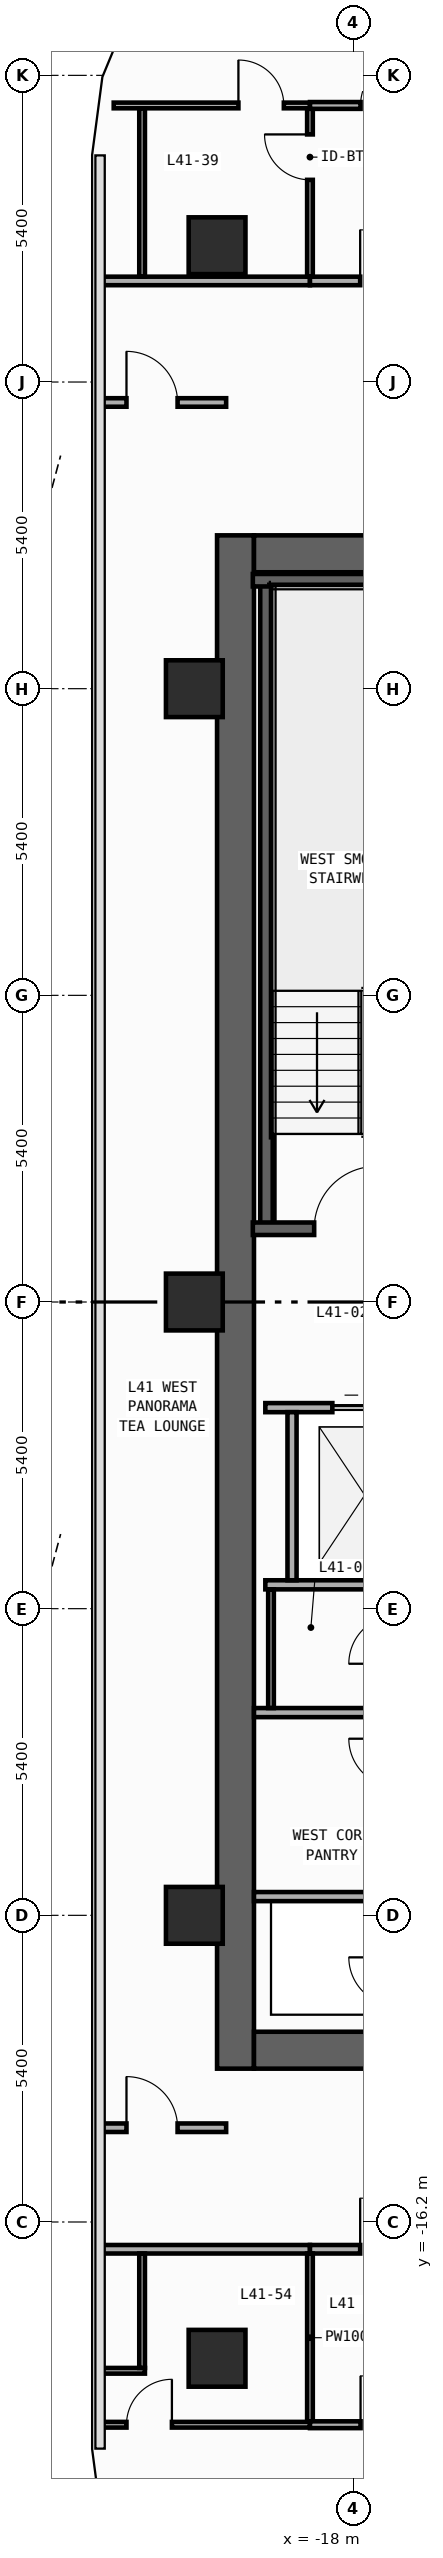
"""IFC4 building model, lengths in metres.
Left out: names, types, materials, properties, quantities, classifications, styles, units other than length and angle.
Written with IfcOpenShell. Run it as: python <this file> out.ifc"""

import sys

from ifc_helpers import new_model, si_unit, direction, frame, frame_2d, origin, origin_2d, place, context, subcontext, project, spatial, rectangle, extrude, element, fill, save


model = new_model("IFC4")
c1 = context("Model", 3, precision=1e-05, world=origin(), true_north=direction((0.0, 1.0)))
c2 = subcontext(c1, "Body", "Model", "MODEL_VIEW")
j1 = project(units=[si_unit("LENGTHUNIT", "METRE"), si_unit("PLANEANGLEUNIT", "RADIAN")], contexts=[c1])
p1 = place(None, origin())
s1 = spatial("IfcSite", under=j1, at=p1, CompositionType="ELEMENT")
p2 = place(p1, origin())
s2 = spatial("IfcBuilding", under=s1, at=p2, CompositionType="ELEMENT")
p3 = place(p2, frame((0.0, 0.0, 180.2)))
s3 = spatial("IfcBuildingStorey", under=s2, at=p3, CompositionType="ELEMENT", Elevation=180.2)
p4 = place(p3, frame((-20.075, -13.5, 0.0), z_axis=(0.0, 0.0, 1.0), x_axis=(0.0, 1.0, 0.0)))
e1 = element("IfcWall", 1, at=p4, inside=s3, PredefinedType="SHEAR", context=c2, shape_type="SweptSolid", body=[
    extrude(rectangle(XDim=27.0, YDim=0.65, at=frame_2d((13.5, 0.0))), origin(), (0.0, 0.0, 1.0), 3.54),
])
for number, where, z_axis, x_axis in (
    (2, (-19.75, -13.175, 0.0), (0.0, 0.0, 1.0), (1.0, 0.0, 0.0)),
    (3, (-19.75, 13.175, 0.0), (0.0, 0.0, 1.0), (1.0, 0.0, 0.0)),
):
    element("IfcWall", number, at=place(p3, frame(where, z_axis=z_axis, x_axis=x_axis)), inside=s3, PredefinedType="SHEAR", context=c2, shape_type="SweptSolid", body=[
        extrude(rectangle(XDim=7.1, YDim=0.65, at=frame_2d((3.55, 0.0))), origin(), (0.0, 0.0, 1.0), 3.54),
    ])
p5 = place(p3, frame((-19.53, 1.29, 0.0), z_axis=(0.0, 0.0, 1.0), x_axis=(0.0, 1.0, 0.0)))
e4 = element("IfcWall", 4, at=p5, inside=s3, PredefinedType="SHEAR", context=c2, shape_type="SweptSolid", body=[
    extrude(rectangle(XDim=11.42, YDim=0.22, at=frame_2d((5.71, 0.0))), origin(), (0.0, 0.0, 1.0), 3.54),
])
p6 = place(p3, frame((-19.77, 12.71, 0.0), z_axis=(0.0, 0.0, 1.0), x_axis=(1.0, 0.0, 0.0)))
e5 = element("IfcWall", 5, at=p6, inside=s3, PredefinedType="SHEAR", context=c2, shape_type="SweptSolid", body=[
    extrude(rectangle(XDim=4.065, YDim=0.22, at=frame_2d((2.032, 0.0))), origin(), (0.0, 0.0, 1.0), 3.54),
])
p7 = place(p3, frame((-19.77, 1.29, 0.0), z_axis=(0.0, 0.0, 1.0), x_axis=(1.0, 0.0, 0.0)))
e6 = element("IfcWall", 6, at=p7, inside=s3, PredefinedType="SHEAR", context=c2, shape_type="SweptSolid", body=[
    extrude(rectangle(XDim=4.065, YDim=0.22, at=frame_2d((2.032, 0.0))), origin(), (0.0, 0.0, 1.0), 3.54),
])
p8 = place(p7, frame((1.08, 0.0, 0.0)))
e7 = element("IfcOpeningElement", 7, at=p8, cuts=e6, PredefinedType="OPENING", context=c2, shape_type="SweptSolid", body=[
    extrude(rectangle(XDim=1.1, YDim=2.2, at=frame_2d((0.55, 1.1))), frame((0.0, 0.12, 0.0), z_axis=(0.0, -1.0, 0.0), x_axis=(1.0, 0.0, 0.0)), (0.0, 0.0, 1.0), 0.24),
])
for number, where, z_axis, x_axis in (
    (8, (-20.4, -18.6, 0.0), (0.0, 0.0, 1.0), (1.0, 0.0, 0.0)),
    (9, (-20.4, 18.6, 0.0), (0.0, 0.0, 1.0), (1.0, 0.0, 0.0)),
    (10, (-20.8, -10.8, 0.0), (0.0, 0.0, 1.0), (1.0, 0.0, 0.0)),
    (11, (-20.8, 0.0, 0.0), (0.0, 0.0, 1.0), (1.0, 0.0, 0.0)),
    (12, (-20.8, 10.8, 0.0), (0.0, 0.0, 1.0), (1.0, 0.0, 0.0)),
):
    element("IfcColumn", number, at=place(p3, frame(where, z_axis=z_axis, x_axis=x_axis)), inside=s3, PredefinedType="COLUMN", context=c2, shape_type="SweptSolid", body=[
        extrude(rectangle(XDim=1.0, YDim=1.0, at=origin_2d()), origin(), (0.0, 0.0, 1.0), 3.8),
    ])
p9 = place(p3, frame((-19.55, -1.86, 0.0), z_axis=(0.0, 0.0, 1.0), x_axis=(1.0, 0.0, 0.0)))
e13 = element("IfcWall", 13, at=p9, inside=s3, PredefinedType="STANDARD", context=c2, shape_type="SweptSolid", body=[
    extrude(rectangle(XDim=3.8, YDim=0.16, at=frame_2d((1.9, 0.0))), origin(), (0.0, 0.0, 1.0), 3.54),
])
p10 = place(p9, frame((1.18, 0.0, 0.0)))
e14 = element("IfcOpeningElement", 14, at=p10, cuts=e13, PredefinedType="OPENING", context=c2, shape_type="SweptSolid", body=[
    extrude(rectangle(XDim=1.15, YDim=2.2, at=frame_2d((0.575, 1.1))), frame((0.0, 0.09, 0.0), z_axis=(0.0, -1.0, 0.0), x_axis=(1.0, 0.0, 0.0)), (0.0, 0.0, 1.0), 0.18),
])
p11 = place(p3, frame((-19.55, -4.98, 0.0), z_axis=(0.0, 0.0, 1.0), x_axis=(1.0, 0.0, 0.0)))
e15 = element("IfcWall", 15, at=p11, inside=s3, PredefinedType="STANDARD", context=c2, shape_type="SweptSolid", body=[
    extrude(rectangle(XDim=3.8, YDim=0.16, at=frame_2d((1.9, 0.0))), origin(), (0.0, 0.0, 1.0), 3.54),
])
p12 = place(p3, frame((-19.08, -4.9, 0.0), z_axis=(0.0, 0.0, 1.0), x_axis=(0.0, 1.0, 0.0)))
e16 = element("IfcWall", 16, at=p12, inside=s3, PredefinedType="STANDARD", context=c2, shape_type="SweptSolid", body=[
    extrude(rectangle(XDim=2.96, YDim=0.16, at=frame_2d((1.48, 0.0))), origin(), (0.0, 0.0, 1.0), 3.54),
])
for number, where, z_axis, x_axis in (
    (17, (-19.75, -10.47, 0.0), (0.0, 0.0, 1.0), (1.0, 0.0, 0.0)),
    (18, (-19.75, -7.23, 0.0), (0.0, 0.0, 1.0), (1.0, 0.0, 0.0)),
):
    element("IfcWall", number, at=place(p3, frame(where, z_axis=z_axis, x_axis=x_axis)), inside=s3, PredefinedType="PARTITIONING", context=c2, shape_type="SweptSolid", body=[
        extrude(rectangle(XDim=2.44, YDim=0.16, at=frame_2d((1.22, 0.0))), origin(), (0.0, 0.0, 1.0), 3.54),
    ])
p13 = place(p3, frame((-22.455, 17.98, 0.0), z_axis=(0.0, 0.0, 1.0), x_axis=(1.0, 0.0, 0.0)))
e19 = element("IfcWall", 19, at=p13, inside=s3, PredefinedType="PARTITIONING", context=c2, shape_type="SweptSolid", body=[
    extrude(rectangle(XDim=3.691, YDim=0.15, at=frame_2d((1.846, 0.0))), origin(), (0.0, 0.0, 1.0), 3.54),
])
p14 = place(p3, frame((-18.764, 17.98, 0.0), z_axis=(0.0, 0.0, 1.0), x_axis=(1.0, 0.0, 0.0)))
e20 = element("IfcWall", 20, at=p14, inside=s3, PredefinedType="PARTITIONING", context=c2, shape_type="SweptSolid", body=[
    extrude(rectangle(XDim=4.364, YDim=0.15, at=frame_2d((2.182, 0.0))), origin(), (0.0, 0.0, 1.0), 3.54),
])
p15 = place(p14, frame((0.884, 0.0, 0.0)))
e21 = element("IfcOpeningElement", 21, at=p15, cuts=e20, PredefinedType="OPENING", context=c2, shape_type="SweptSolid", body=[
    extrude(rectangle(XDim=0.9, YDim=2.15, at=frame_2d((0.45, 1.075))), frame((0.0, 0.085, 0.0), z_axis=(0.0, -1.0, 0.0), x_axis=(1.0, 0.0, 0.0)), (0.0, 0.0, 1.0), 0.17),
])
p16 = place(p3, frame((-22.455, 15.84, 0.0), z_axis=(0.0, 0.0, 1.0), x_axis=(1.0, 0.0, 0.0)))
e22 = element("IfcWall", 22, at=p16, inside=s3, PredefinedType="PARTITIONING", context=c2, shape_type="SweptSolid", body=[
    extrude(rectangle(XDim=2.215, YDim=0.15, at=frame_2d((1.107, 0.0))), origin(), (0.0, 0.0, 1.0), 3.54),
])
p17 = place(p16, frame((0.46, 0.0, 0.0)))
e23 = element("IfcOpeningElement", 23, at=p17, cuts=e22, PredefinedType="OPENING", context=c2, shape_type="SweptSolid", body=[
    extrude(rectangle(XDim=0.9, YDim=2.15, at=frame_2d((0.45, 1.075))), frame((0.0, 0.085, 0.0), z_axis=(0.0, -1.0, 0.0), x_axis=(1.0, 0.0, 0.0)), (0.0, 0.0, 1.0), 0.17),
])
p18 = place(p3, frame((-22.455, -16.68, 0.0), z_axis=(0.0, 0.0, 1.0), x_axis=(1.0, 0.0, 0.0)))
e24 = element("IfcWall", 24, at=p18, inside=s3, PredefinedType="PARTITIONING", context=c2, shape_type="SweptSolid", body=[
    extrude(rectangle(XDim=3.691, YDim=0.15, at=frame_2d((1.846, 0.0))), origin(), (0.0, 0.0, 1.0), 3.54),
])
p19 = place(p3, frame((-18.764, -16.68, 0.0), z_axis=(0.0, 0.0, 1.0), x_axis=(1.0, 0.0, 0.0)))
e25 = element("IfcWall", 25, at=p19, inside=s3, PredefinedType="PARTITIONING", context=c2, shape_type="SweptSolid", body=[
    extrude(rectangle(XDim=4.364, YDim=0.15, at=frame_2d((2.182, 0.0))), origin(), (0.0, 0.0, 1.0), 3.54),
])
p20 = place(p19, frame((0.884, 0.0, 0.0)))
e26 = element("IfcOpeningElement", 26, at=p20, cuts=e25, PredefinedType="OPENING", context=c2, shape_type="SweptSolid", body=[
    extrude(rectangle(XDim=0.9, YDim=2.15, at=frame_2d((0.45, 1.075))), frame((0.0, 0.085, 0.0), z_axis=(0.0, -1.0, 0.0), x_axis=(1.0, 0.0, 0.0)), (0.0, 0.0, 1.0), 0.17),
])
p21 = place(p3, frame((-22.455, -14.54, 0.0), z_axis=(0.0, 0.0, 1.0), x_axis=(1.0, 0.0, 0.0)))
e27 = element("IfcWall", 27, at=p21, inside=s3, PredefinedType="PARTITIONING", context=c2, shape_type="SweptSolid", body=[
    extrude(rectangle(XDim=2.215, YDim=0.15, at=frame_2d((1.107, 0.0))), origin(), (0.0, 0.0, 1.0), 3.54),
])
p22 = place(p21, frame((0.46, 0.0, 0.0)))
e28 = element("IfcOpeningElement", 28, at=p22, cuts=e27, PredefinedType="OPENING", context=c2, shape_type="SweptSolid", body=[
    extrude(rectangle(XDim=0.9, YDim=2.15, at=frame_2d((0.45, 1.075))), frame((0.0, 0.085, 0.0), z_axis=(0.0, -1.0, 0.0), x_axis=(1.0, 0.0, 0.0)), (0.0, 0.0, 1.0), 0.17),
])
p23 = place(p3, frame((-18.764, 18.055, 0.0), z_axis=(0.0, 0.0, 1.0), x_axis=(0.0, 1.0, 0.0)))
e29 = element("IfcWall", 29, at=p23, inside=s3, PredefinedType="PARTITIONING", context=c2, shape_type="SweptSolid", body=[
    extrude(rectangle(XDim=2.965, YDim=0.1, at=frame_2d((1.482, 0.0))), origin(), (0.0, 0.0, 1.0), 3.54),
])
p24 = place(p23, frame((1.705, 0.0, 0.0)))
e30 = element("IfcOpeningElement", 30, at=p24, cuts=e29, PredefinedType="OPENING", context=c2, shape_type="SweptSolid", body=[
    extrude(rectangle(XDim=0.8, YDim=2.1, at=frame_2d((0.4, 1.05))), frame((0.0, 0.06, 0.0), z_axis=(0.0, -1.0, 0.0), x_axis=(1.0, 0.0, 0.0)), (0.0, 0.0, 1.0), 0.12),
])
p25 = place(p3, frame((-22.22, 21.07, 0.0), z_axis=(0.0, 0.0, 1.0), x_axis=(1.0, 0.0, 0.0)))
e31 = element("IfcWall", 31, at=p25, inside=s3, PredefinedType="PARTITIONING", context=c2, shape_type="SweptSolid", body=[
    extrude(rectangle(XDim=3.456, YDim=0.1, at=frame_2d((1.728, 0.0))), origin(), (0.0, 0.0, 1.0), 3.54),
])
p26 = place(p25, frame((2.196, 0.0, 0.0)))
e32 = element("IfcOpeningElement", 32, at=p26, cuts=e31, PredefinedType="OPENING", context=c2, shape_type="SweptSolid", body=[
    extrude(rectangle(XDim=0.8, YDim=2.1, at=frame_2d((0.4, 1.05))), frame((0.0, 0.06, 0.0), z_axis=(0.0, -1.0, 0.0), x_axis=(1.0, 0.0, 0.0)), (0.0, 0.0, 1.0), 0.12),
])
p27 = place(p3, frame((-18.764, 21.07, 0.0), z_axis=(0.0, 0.0, 1.0), x_axis=(1.0, 0.0, 0.0)))
e33 = element("IfcWall", 33, at=p27, inside=s3, PredefinedType="PARTITIONING", context=c2, shape_type="SweptSolid", body=[
    extrude(rectangle(XDim=4.364, YDim=0.12, at=frame_2d((2.182, 0.0))), origin(), (0.0, 0.0, 1.0), 3.54),
])
p28 = place(p27, frame((0.891, 0.0, 0.0)))
e34 = element("IfcOpeningElement", 34, at=p28, cuts=e33, PredefinedType="OPENING", context=c2, shape_type="SweptSolid", body=[
    extrude(rectangle(XDim=0.86, YDim=2.15, at=frame_2d((0.43, 1.075))), frame((0.0, 0.07, 0.0), z_axis=(0.0, -1.0, 0.0), x_axis=(1.0, 0.0, 0.0)), (0.0, 0.0, 1.0), 0.14),
])
p29 = place(p3, frame((-18.764, -19.72, 0.0), z_axis=(0.0, 0.0, 1.0), x_axis=(0.0, 1.0, 0.0)))
e35 = element("IfcWall", 35, at=p29, inside=s3, PredefinedType="PARTITIONING", context=c2, shape_type="SweptSolid", body=[
    extrude(rectangle(XDim=2.965, YDim=0.1, at=frame_2d((1.482, 0.0))), origin(), (0.0, 0.0, 1.0), 3.54),
])
p30 = place(p3, frame((-22.455, -19.77, 0.0), z_axis=(0.0, 0.0, 1.0), x_axis=(1.0, 0.0, 0.0)))
e36 = element("IfcWall", 36, at=p30, inside=s3, PredefinedType="PARTITIONING", context=c2, shape_type="SweptSolid", body=[
    extrude(rectangle(XDim=3.691, YDim=0.1, at=frame_2d((1.846, 0.0))), origin(), (0.0, 0.0, 1.0), 3.54),
])
p31 = place(p30, frame((0.46, 0.0, 0.0)))
e37 = element("IfcOpeningElement", 37, at=p31, cuts=e36, PredefinedType="OPENING", context=c2, shape_type="SweptSolid", body=[
    extrude(rectangle(XDim=0.8, YDim=2.1, at=frame_2d((0.4, 1.05))), frame((0.0, 0.06, 0.0), z_axis=(0.0, -1.0, 0.0), x_axis=(1.0, 0.0, 0.0)), (0.0, 0.0, 1.0), 0.12),
])
p32 = place(p3, frame((-18.764, -19.77, 0.0), z_axis=(0.0, 0.0, 1.0), x_axis=(1.0, 0.0, 0.0)))
e38 = element("IfcWall", 38, at=p32, inside=s3, PredefinedType="PARTITIONING", context=c2, shape_type="SweptSolid", body=[
    extrude(rectangle(XDim=4.364, YDim=0.12, at=frame_2d((2.182, 0.0))), origin(), (0.0, 0.0, 1.0), 3.54),
])
p33 = place(p32, frame((0.891, 0.0, 0.0)))
e39 = element("IfcOpeningElement", 39, at=p33, cuts=e38, PredefinedType="OPENING", context=c2, shape_type="SweptSolid", body=[
    extrude(rectangle(XDim=0.86, YDim=2.15, at=frame_2d((0.43, 1.075))), frame((0.0, 0.07, 0.0), z_axis=(0.0, -1.0, 0.0), x_axis=(1.0, 0.0, 0.0)), (0.0, 0.0, 1.0), 0.14),
])
p34 = place(p3, frame((-19.45, -7.15, 0.0), z_axis=(0.0, 0.0, 1.0), x_axis=(0.0, 1.0, 0.0)))
e40 = element("IfcWall", 40, at=p34, inside=s3, PredefinedType="PARTITIONING", context=c2, shape_type="SweptSolid", body=[
    extrude(rectangle(XDim=2.09, YDim=0.1, at=frame_2d((1.045, 0.0))), origin(), (0.0, 0.0, 1.0), 3.54),
])
p35 = place(p3, frame((-21.72, 18.055, 0.0), z_axis=(0.0, 0.0, 1.0), x_axis=(0.0, 1.0, 0.0)))
e41 = element("IfcWall", 41, at=p35, inside=s3, PredefinedType="PARTITIONING", context=c2, shape_type="SweptSolid", body=[
    extrude(rectangle(XDim=2.965, YDim=0.1, at=frame_2d((1.482, 0.0))), origin(), (0.0, 0.0, 1.0), 3.54),
])
p36 = place(p3, frame((-21.67, -18.82, 0.0), z_axis=(0.0, 0.0, 1.0), x_axis=(-1.0, 0.0, 0.0)))
e42 = element("IfcWall", 42, at=p36, inside=s3, PredefinedType="PARTITIONING", context=c2, shape_type="SweptSolid", body=[
    extrude(rectangle(XDim=0.785, YDim=0.1, at=frame_2d((0.393, 0.0))), origin(), (0.0, 0.0, 1.0), 3.54),
])
p37 = place(p3, frame((-21.72, -18.77, 0.0), z_axis=(0.0, 0.0, 1.0), x_axis=(0.0, 1.0, 0.0)))
e43 = element("IfcWall", 43, at=p37, inside=s3, PredefinedType="PARTITIONING", context=c2, shape_type="SweptSolid", body=[
    extrude(rectangle(XDim=2.015, YDim=0.1, at=frame_2d((1.008, 0.0))), origin(), (0.0, 0.0, 1.0), 3.54),
])
p38 = place(p8, origin())
e44 = element("IfcDoor", 44, at=p38, inside=s3, OperationType="SINGLE_SWING_RIGHT", PredefinedType="DOOR", context=c2, shape_type="SweptSolid", body=[
    extrude(rectangle(XDim=1.1, YDim=2.2, at=frame_2d((0.55, 1.1))), frame((0.0, 0.025, 0.0), z_axis=(0.0, -1.0, 0.0), x_axis=(1.0, 0.0, 0.0)), (0.0, 0.0, 1.0), 0.05),
])
fill(e7, e44)
p39 = place(p10, origin())
e45 = element("IfcDoor", 45, at=p39, inside=s3, OperationType="DOUBLE_DOOR_SLIDING", PredefinedType="DOOR", context=c2, shape_type="SweptSolid", body=[
    extrude(rectangle(XDim=1.15, YDim=2.2, at=frame_2d((0.575, 1.1))), frame((0.0, 0.025, 0.0), z_axis=(0.0, -1.0, 0.0), x_axis=(1.0, 0.0, 0.0)), (0.0, 0.0, 1.0), 0.05),
])
fill(e14, e45)
p40 = place(p15, origin())
e46 = element("IfcDoor", 46, at=p40, inside=s3, OperationType="SINGLE_SWING_LEFT", PredefinedType="DOOR", context=c2, shape_type="SweptSolid", body=[
    extrude(rectangle(XDim=0.9, YDim=2.15, at=frame_2d((0.45, 1.075))), frame((0.0, 0.025, 0.0), z_axis=(0.0, -1.0, 0.0), x_axis=(1.0, 0.0, 0.0)), (0.0, 0.0, 1.0), 0.05),
])
fill(e21, e46)
p41 = place(p17, origin())
e47 = element("IfcDoor", 47, at=p41, inside=s3, OperationType="SINGLE_SWING_LEFT", PredefinedType="DOOR", context=c2, shape_type="SweptSolid", body=[
    extrude(rectangle(XDim=0.9, YDim=2.15, at=frame_2d((0.45, 1.075))), frame((0.0, 0.025, 0.0), z_axis=(0.0, -1.0, 0.0), x_axis=(1.0, 0.0, 0.0)), (0.0, 0.0, 1.0), 0.05),
])
fill(e23, e47)
p42 = place(p20, origin())
e48 = element("IfcDoor", 48, at=p42, inside=s3, OperationType="SINGLE_SWING_LEFT", PredefinedType="DOOR", context=c2, shape_type="SweptSolid", body=[
    extrude(rectangle(XDim=0.9, YDim=2.15, at=frame_2d((0.45, 1.075))), frame((0.0, 0.025, 0.0), z_axis=(0.0, -1.0, 0.0), x_axis=(1.0, 0.0, 0.0)), (0.0, 0.0, 1.0), 0.05),
])
fill(e26, e48)
p43 = place(p22, origin())
e49 = element("IfcDoor", 49, at=p43, inside=s3, OperationType="SINGLE_SWING_LEFT", PredefinedType="DOOR", context=c2, shape_type="SweptSolid", body=[
    extrude(rectangle(XDim=0.9, YDim=2.15, at=frame_2d((0.45, 1.075))), frame((0.0, 0.025, 0.0), z_axis=(0.0, -1.0, 0.0), x_axis=(1.0, 0.0, 0.0)), (0.0, 0.0, 1.0), 0.05),
])
fill(e28, e49)
p44 = place(p24, origin())
e50 = element("IfcDoor", 50, at=p44, inside=s3, OperationType="SINGLE_SWING_RIGHT", PredefinedType="DOOR", context=c2, shape_type="SweptSolid", body=[
    extrude(rectangle(XDim=0.8, YDim=2.1, at=frame_2d((0.4, 1.05))), frame((0.0, 0.025, 0.0), z_axis=(0.0, -1.0, 0.0), x_axis=(1.0, 0.0, 0.0)), (0.0, 0.0, 1.0), 0.05),
])
fill(e30, e50)
p45 = place(p26, origin())
e51 = element("IfcDoor", 51, at=p45, inside=s3, OperationType="SINGLE_SWING_LEFT", PredefinedType="DOOR", context=c2, shape_type="SweptSolid", body=[
    extrude(rectangle(XDim=0.8, YDim=2.1, at=frame_2d((0.4, 1.05))), frame((0.0, 0.025, 0.0), z_axis=(0.0, -1.0, 0.0), x_axis=(1.0, 0.0, 0.0)), (0.0, 0.0, 1.0), 0.05),
])
fill(e32, e51)
p46 = place(p28, origin())
e52 = element("IfcDoor", 52, at=p46, inside=s3, OperationType="SINGLE_SWING_RIGHT", PredefinedType="DOOR", context=c2, shape_type="SweptSolid", body=[
    extrude(rectangle(XDim=0.86, YDim=2.15, at=frame_2d((0.43, 1.075))), frame((0.0, 0.025, 0.0), z_axis=(0.0, -1.0, 0.0), x_axis=(1.0, 0.0, 0.0)), (0.0, 0.0, 1.0), 0.05),
])
fill(e34, e52)
p47 = place(p31, origin())
e53 = element("IfcDoor", 53, at=p47, inside=s3, OperationType="SINGLE_SWING_RIGHT", PredefinedType="DOOR", context=c2, shape_type="SweptSolid", body=[
    extrude(rectangle(XDim=0.8, YDim=2.1, at=frame_2d((0.4, 1.05))), frame((0.0, 0.025, 0.0), z_axis=(0.0, -1.0, 0.0), x_axis=(1.0, 0.0, 0.0)), (0.0, 0.0, 1.0), 0.05),
])
fill(e37, e53)
p48 = place(p33, origin())
e54 = element("IfcDoor", 54, at=p48, inside=s3, OperationType="SINGLE_SWING_LEFT", PredefinedType="DOOR", context=c2, shape_type="SweptSolid", body=[
    extrude(rectangle(XDim=0.86, YDim=2.15, at=frame_2d((0.43, 1.075))), frame((0.0, 0.025, 0.0), z_axis=(0.0, -1.0, 0.0), x_axis=(1.0, 0.0, 0.0)), (0.0, 0.0, 1.0), 0.05),
])
fill(e39, e54)
save(model, sys.argv[1])
